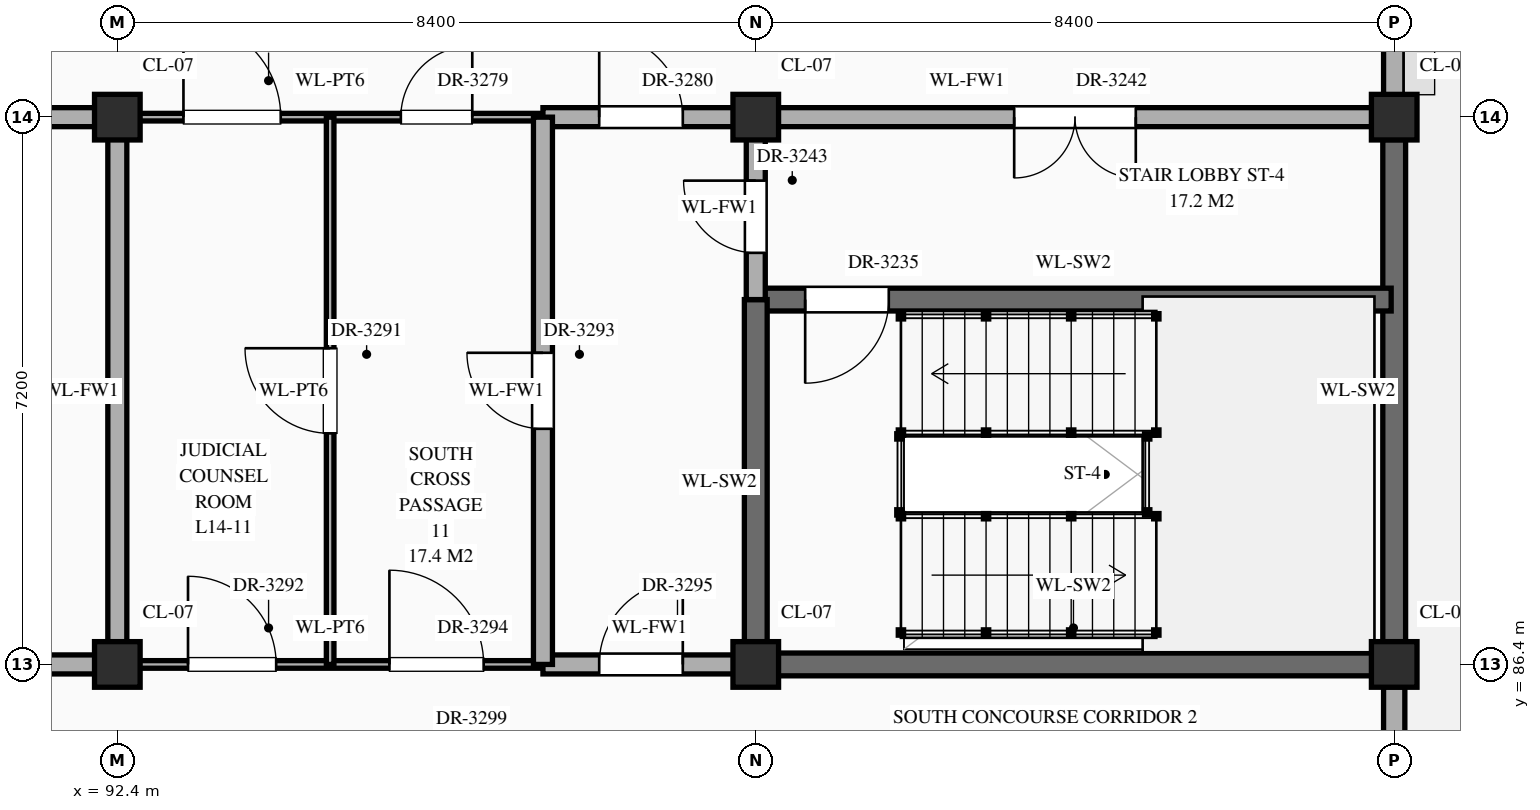
"""IFC4 building model, lengths in metres.
Left out: names, types, materials, properties, quantities, classifications, styles, units other than length and angle.
Written with IfcOpenShell. Run it as: python <this file> out.ifc"""

import sys

from ifc_helpers import new_model, si_unit, direction, frame, frame_2d, origin, origin_2d, place, context, subcontext, project, spatial, rectangle, extrude, element, fill, save


model = new_model("IFC4")
c1 = context("Model", 3, precision=1e-05, world=origin(), true_north=direction((0.0, 1.0)))
c2 = subcontext(c1, "Body", "Model", "MODEL_VIEW")
j1 = project(units=[si_unit("LENGTHUNIT", "METRE"), si_unit("PLANEANGLEUNIT", "RADIAN")], contexts=[c1])
p1 = place(None, origin())
s1 = spatial("IfcSite", under=j1, at=p1, CompositionType="ELEMENT")
p2 = place(p1, origin())
s2 = spatial("IfcBuilding", under=s1, at=p2, CompositionType="ELEMENT")
p3 = place(p2, frame((0.0, 0.0, 60.3)))
s3 = spatial("IfcBuildingStorey", under=s2, at=p3, CompositionType="ELEMENT", Elevation=60.3)
for number, where, z_axis, x_axis in (
    (1, (92.4, 86.4, 0.0), (0.0, 0.0, 1.0), (1.0, 0.0, 0.0)),
    (2, (92.4, 93.6, 0.0), (0.0, 0.0, 1.0), (1.0, 0.0, 0.0)),
    (3, (100.8, 86.4, 0.0), (0.0, 0.0, 1.0), (1.0, 0.0, 0.0)),
    (4, (100.8, 93.6, 0.0), (0.0, 0.0, 1.0), (1.0, 0.0, 0.0)),
    (5, (109.2, 86.4, 0.0), (0.0, 0.0, 1.0), (1.0, 0.0, 0.0)),
    (6, (109.2, 93.6, 0.0), (0.0, 0.0, 1.0), (1.0, 0.0, 0.0)),
):
    element("IfcColumn", number, at=place(p3, frame(where, z_axis=z_axis, x_axis=x_axis)), inside=s3, PredefinedType="COLUMN", context=c2, shape_type="SweptSolid", body=[
        extrude(rectangle(XDim=0.6, YDim=0.6, at=origin_2d()), origin(), (0.0, 0.0, 1.0), 4.2),
    ])
p4 = place(p3, frame((109.2, 79.495, 0.0), z_axis=(0.0, 0.0, 1.0), x_axis=(0.0, 1.0, 0.0)))
e7 = element("IfcWall", 7, at=p4, inside=s3, PredefinedType="STANDARD", context=c2, shape_type="SweptSolid", body=[
    extrude(rectangle(XDim=6.61, YDim=0.28, at=frame_2d((3.305, 0.0))), origin(), (0.0, 0.0, 1.0), 3.31),
])
p5 = place(p4, frame((1.205, 0.0, 0.0)))
e8 = element("IfcOpeningElement", 8, at=p5, cuts=e7, PredefinedType="OPENING", context=c2, shape_type="SweptSolid", body=[
    extrude(rectangle(XDim=1.8, YDim=2.25, at=frame_2d((0.9, 1.125))), frame((0.0, 0.152, 0.0), z_axis=(0.0, -1.0, 0.0), x_axis=(1.0, 0.0, 0.0)), (0.0, 0.0, 1.0), 0.304),
])
p6 = place(p3, frame((109.2, 86.695, 0.0), z_axis=(0.0, 0.0, 1.0), x_axis=(0.0, 1.0, 0.0)))
e9 = element("IfcWall", 9, at=p6, inside=s3, PredefinedType="SHEAR", context=c2, shape_type="SweptSolid", body=[
    extrude(rectangle(XDim=6.61, YDim=0.3, at=frame_2d((3.305, 0.0))), origin(), (0.0, 0.0, 1.0), 3.96),
])
p7 = place(p3, frame((109.2, 93.895, 0.0), z_axis=(0.0, 0.0, 1.0), x_axis=(0.0, 1.0, 0.0)))
e10 = element("IfcWall", 10, at=p7, inside=s3, PredefinedType="STANDARD", context=c2, shape_type="SweptSolid", body=[
    extrude(rectangle(XDim=6.61, YDim=0.28, at=frame_2d((3.305, 0.0))), origin(), (0.0, 0.0, 1.0), 3.31),
])
p8 = place(p7, frame((4.08, 0.0, 0.85)))
e11 = element("IfcOpeningElement", 11, at=p8, cuts=e10, PredefinedType="OPENING", context=c2, shape_type="SweptSolid", body=[
    extrude(rectangle(XDim=1.05, YDim=1.2, at=frame_2d((0.525, 0.6))), frame((0.0, 0.152, 0.0), z_axis=(0.0, -1.0, 0.0), x_axis=(1.0, 0.0, 0.0)), (0.0, 0.0, 1.0), 0.304),
])
p9 = place(p3, frame((84.0, 86.4, 0.0), z_axis=(0.0, 0.0, 1.0), x_axis=(1.0, 0.0, 0.0)))
e12 = element("IfcWall", 12, at=p9, inside=s3, PredefinedType="STANDARD", context=c2, shape_type="SweptSolid", body=[
    extrude(rectangle(XDim=8.4, YDim=0.25, at=frame_2d((4.2, 0.0))), origin(), (0.0, 0.0, 1.0), 3.11),
])
p10 = place(p9, frame((3.7, 0.0, 0.0)))
e13 = element("IfcOpeningElement", 13, at=p10, cuts=e12, PredefinedType="OPENING", context=c2, shape_type="SweptSolid", body=[
    extrude(rectangle(XDim=1.0, YDim=2.2, at=frame_2d((0.5, 1.1))), frame((0.0, 0.137, 0.0), z_axis=(0.0, -1.0, 0.0), x_axis=(1.0, 0.0, 0.0)), (0.0, 0.0, 1.0), 0.274),
])
p11 = place(p3, frame((92.4, 86.4, 0.0), z_axis=(0.0, 0.0, 1.0), x_axis=(1.0, 0.0, 0.0)))
e14 = element("IfcWall", 14, at=p11, inside=s3, PredefinedType="STANDARD", context=c2, shape_type="SweptSolid", body=[
    extrude(rectangle(XDim=5.6, YDim=0.1, at=frame_2d((2.8, 0.0))), origin(), (0.0, 0.0, 1.0), 3.11),
])
p12 = place(p11, frame((0.93, 0.0, 0.0)))
e15 = element("IfcOpeningElement", 15, at=p12, cuts=e14, PredefinedType="OPENING", context=c2, shape_type="SweptSolid", body=[
    extrude(rectangle(XDim=1.16, YDim=2.3, at=frame_2d((0.58, 1.15))), frame((0.0, 0.062, 0.0), z_axis=(0.0, -1.0, 0.0), x_axis=(1.0, 0.0, 0.0)), (0.0, 0.0, 1.0), 0.124),
])
p13 = place(p11, frame((3.58, 0.0, 0.0)))
e16 = element("IfcOpeningElement", 16, at=p13, cuts=e14, PredefinedType="OPENING", context=c2, shape_type="SweptSolid", body=[
    extrude(rectangle(XDim=1.24, YDim=2.3, at=frame_2d((0.62, 1.15))), frame((0.0, 0.062, 0.0), z_axis=(0.0, -1.0, 0.0), x_axis=(1.0, 0.0, 0.0)), (0.0, 0.0, 1.0), 0.124),
])
p14 = place(p3, frame((98.0, 86.4, 0.0), z_axis=(0.0, 0.0, 1.0), x_axis=(1.0, 0.0, 0.0)))
e17 = element("IfcWall", 17, at=p14, inside=s3, PredefinedType="STANDARD", context=c2, shape_type="SweptSolid", body=[
    extrude(rectangle(XDim=2.8, YDim=0.25, at=frame_2d((1.4, 0.0))), origin(), (0.0, 0.0, 1.0), 3.11),
])
p15 = place(p14, frame((0.74, 0.0, 0.0)))
e18 = element("IfcOpeningElement", 18, at=p15, cuts=e17, PredefinedType="OPENING", context=c2, shape_type="SweptSolid", body=[
    extrude(rectangle(XDim=1.1, YDim=2.2, at=frame_2d((0.55, 1.1))), frame((0.0, 0.137, 0.0), z_axis=(0.0, -1.0, 0.0), x_axis=(1.0, 0.0, 0.0)), (0.0, 0.0, 1.0), 0.274),
])
p16 = place(p3, frame((100.8, 86.4, 0.0), z_axis=(0.0, 0.0, 1.0), x_axis=(1.0, 0.0, 0.0)))
e19 = element("IfcWall", 19, at=p16, inside=s3, PredefinedType="SHEAR", context=c2, shape_type="SweptSolid", body=[
    extrude(rectangle(XDim=8.36, YDim=0.3, at=frame_2d((4.18, 0.0))), origin(), (0.0, 0.0, 1.0), 3.96),
])
p17 = place(p3, frame((100.8, 91.2, 0.0), z_axis=(0.0, 0.0, 1.0), x_axis=(1.0, 0.0, 0.0)))
e20 = element("IfcWall", 20, at=p17, inside=s3, PredefinedType="SHEAR", context=c2, shape_type="SweptSolid", body=[
    extrude(rectangle(XDim=8.36, YDim=0.3, at=frame_2d((4.18, 0.0))), origin(), (0.0, 0.0, 1.0), 3.96),
])
p18 = place(p17, frame((0.65, 0.0, 0.0)))
e21 = element("IfcOpeningElement", 21, at=p18, cuts=e20, PredefinedType="OPENING", context=c2, shape_type="SweptSolid", body=[
    extrude(rectangle(XDim=1.1, YDim=2.2, at=frame_2d((0.55, 1.1))), frame((0.0, 0.162, 0.0), z_axis=(0.0, -1.0, 0.0), x_axis=(1.0, 0.0, 0.0)), (0.0, 0.0, 1.0), 0.324),
])
p19 = place(p3, frame((84.0, 93.6, 0.0), z_axis=(0.0, 0.0, 1.0), x_axis=(1.0, 0.0, 0.0)))
e22 = element("IfcWall", 22, at=p19, inside=s3, PredefinedType="STANDARD", context=c2, shape_type="SweptSolid", body=[
    extrude(rectangle(XDim=8.4, YDim=0.25, at=frame_2d((4.2, 0.0))), origin(), (0.0, 0.0, 1.0), 3.11),
])
p20 = place(p19, frame((3.65, 0.0, 0.0)))
e23 = element("IfcOpeningElement", 23, at=p20, cuts=e22, PredefinedType="OPENING", context=c2, shape_type="SweptSolid", body=[
    extrude(rectangle(XDim=1.1, YDim=2.2, at=frame_2d((0.55, 1.1))), frame((0.0, 0.137, 0.0), z_axis=(0.0, -1.0, 0.0), x_axis=(1.0, 0.0, 0.0)), (0.0, 0.0, 1.0), 0.274),
])
p21 = place(p3, frame((92.4, 93.6, 0.0), z_axis=(0.0, 0.0, 1.0), x_axis=(1.0, 0.0, 0.0)))
e24 = element("IfcWall", 24, at=p21, inside=s3, PredefinedType="STANDARD", context=c2, shape_type="SweptSolid", body=[
    extrude(rectangle(XDim=5.6, YDim=0.1, at=frame_2d((2.8, 0.0))), origin(), (0.0, 0.0, 1.0), 3.11),
])
p22 = place(p21, frame((0.87, 0.0, 0.0)))
e25 = element("IfcOpeningElement", 25, at=p22, cuts=e24, PredefinedType="OPENING", context=c2, shape_type="SweptSolid", body=[
    extrude(rectangle(XDim=1.28, YDim=2.35, at=frame_2d((0.64, 1.175))), frame((0.0, 0.062, 0.0), z_axis=(0.0, -1.0, 0.0), x_axis=(1.0, 0.0, 0.0)), (0.0, 0.0, 1.0), 0.124),
])
p23 = place(p21, frame((3.73, 0.0, 0.0)))
e26 = element("IfcOpeningElement", 26, at=p23, cuts=e24, PredefinedType="OPENING", context=c2, shape_type="SweptSolid", body=[
    extrude(rectangle(XDim=0.94, YDim=2.3, at=frame_2d((0.47, 1.15))), frame((0.0, 0.062, 0.0), z_axis=(0.0, -1.0, 0.0), x_axis=(1.0, 0.0, 0.0)), (0.0, 0.0, 1.0), 0.124),
])
p24 = place(p3, frame((98.0, 93.6, 0.0), z_axis=(0.0, 0.0, 1.0), x_axis=(1.0, 0.0, 0.0)))
e27 = element("IfcWall", 27, at=p24, inside=s3, PredefinedType="STANDARD", context=c2, shape_type="SweptSolid", body=[
    extrude(rectangle(XDim=11.16, YDim=0.25, at=frame_2d((5.58, 0.0))), origin(), (0.0, 0.0, 1.0), 3.11),
])
p25 = place(p24, frame((6.2, 0.0, 0.0)))
e28 = element("IfcOpeningElement", 28, at=p25, cuts=e27, PredefinedType="OPENING", context=c2, shape_type="SweptSolid", body=[
    extrude(rectangle(XDim=1.6, YDim=2.3, at=frame_2d((0.8, 1.15))), frame((0.0, 0.137, 0.0), z_axis=(0.0, -1.0, 0.0), x_axis=(1.0, 0.0, 0.0)), (0.0, 0.0, 1.0), 0.274),
])
p26 = place(p24, frame((0.74, 0.0, 0.0)))
e29 = element("IfcOpeningElement", 29, at=p26, cuts=e27, PredefinedType="OPENING", context=c2, shape_type="SweptSolid", body=[
    extrude(rectangle(XDim=1.1, YDim=2.2, at=frame_2d((0.55, 1.1))), frame((0.0, 0.137, 0.0), z_axis=(0.0, -1.0, 0.0), x_axis=(1.0, 0.0, 0.0)), (0.0, 0.0, 1.0), 0.274),
])
p27 = place(p3, frame((92.4, 86.4, 0.0), z_axis=(0.0, 0.0, 1.0), x_axis=(0.0, 1.0, 0.0)))
e30 = element("IfcWall", 30, at=p27, inside=s3, PredefinedType="STANDARD", context=c2, shape_type="SweptSolid", body=[
    extrude(rectangle(XDim=7.2, YDim=0.25, at=frame_2d((3.6, 0.0))), origin(), (0.0, 0.0, 1.0), 3.21),
])
p28 = place(p3, frame((95.2, 86.4, 0.0), z_axis=(0.0, 0.0, 1.0), x_axis=(0.0, 1.0, 0.0)))
e31 = element("IfcWall", 31, at=p28, inside=s3, PredefinedType="STANDARD", context=c2, shape_type="SweptSolid", body=[
    extrude(rectangle(XDim=7.2, YDim=0.1, at=frame_2d((3.6, 0.0))), origin(), (0.0, 0.0, 1.0), 3.96),
])
p29 = place(p28, frame((3.04, 0.0, 0.0)))
e32 = element("IfcOpeningElement", 32, at=p29, cuts=e31, PredefinedType="OPENING", context=c2, shape_type="SweptSolid", body=[
    extrude(rectangle(XDim=1.12, YDim=2.25, at=frame_2d((0.56, 1.125))), frame((0.0, 0.062, 0.0), z_axis=(0.0, -1.0, 0.0), x_axis=(1.0, 0.0, 0.0)), (0.0, 0.0, 1.0), 0.124),
])
p30 = place(p3, frame((98.0, 86.4, 0.0), z_axis=(0.0, 0.0, 1.0), x_axis=(0.0, 1.0, 0.0)))
e33 = element("IfcWall", 33, at=p30, inside=s3, PredefinedType="STANDARD", context=c2, shape_type="SweptSolid", body=[
    extrude(rectangle(XDim=7.2, YDim=0.25, at=frame_2d((3.6, 0.0))), origin(), (0.0, 0.0, 1.0), 3.96),
])
p31 = place(p30, frame((3.1, 0.0, 0.0)))
e34 = element("IfcOpeningElement", 34, at=p31, cuts=e33, PredefinedType="OPENING", context=c2, shape_type="SweptSolid", body=[
    extrude(rectangle(XDim=1.0, YDim=2.2, at=frame_2d((0.5, 1.1))), frame((0.0, 0.137, 0.0), z_axis=(0.0, -1.0, 0.0), x_axis=(1.0, 0.0, 0.0)), (0.0, 0.0, 1.0), 0.274),
])
p32 = place(p3, frame((100.8, 86.4, 0.0), z_axis=(0.0, 0.0, 1.0), x_axis=(0.0, 1.0, 0.0)))
e35 = element("IfcWall", 35, at=p32, inside=s3, PredefinedType="SHEAR", context=c2, shape_type="SweptSolid", body=[
    extrude(rectangle(XDim=4.8, YDim=0.3, at=frame_2d((2.4, 0.0))), origin(), (0.0, 0.0, 1.0), 3.96),
])
p33 = place(p3, frame((100.8, 91.2, 0.0), z_axis=(0.0, 0.0, 1.0), x_axis=(0.0, 1.0, 0.0)))
e36 = element("IfcWall", 36, at=p33, inside=s3, PredefinedType="STANDARD", context=c2, shape_type="SweptSolid", body=[
    extrude(rectangle(XDim=2.4, YDim=0.25, at=frame_2d((1.2, 0.0))), origin(), (0.0, 0.0, 1.0), 3.21),
])
p34 = place(p33, frame((0.615, 0.0, 0.0)))
e37 = element("IfcOpeningElement", 37, at=p34, cuts=e36, PredefinedType="OPENING", context=c2, shape_type="SweptSolid", body=[
    extrude(rectangle(XDim=0.95, YDim=2.15, at=frame_2d((0.475, 1.075))), frame((0.0, 0.137, 0.0), z_axis=(0.0, -1.0, 0.0), x_axis=(1.0, 0.0, 0.0)), (0.0, 0.0, 1.0), 0.274),
])
p35 = place(p18, frame((1.1, 0.0, 0.0), z_axis=(0.0, 0.0, 1.0), x_axis=(-1.0, 0.0, 0.0)))
e38 = element("IfcDoor", 38, at=p35, inside=s3, OperationType="SINGLE_SWING_RIGHT", PredefinedType="DOOR", context=c2, shape_type="SweptSolid", body=[
    extrude(rectangle(XDim=1.1, YDim=2.2, at=frame_2d((0.55, 1.1))), frame((0.0, 0.025, 0.0), z_axis=(0.0, -1.0, 0.0), x_axis=(1.0, 0.0, 0.0)), (0.0, 0.0, 1.0), 0.05),
])
fill(e21, e38)
p36 = place(p25, frame((1.6, 0.0, 0.0), z_axis=(0.0, 0.0, 1.0), x_axis=(-1.0, 0.0, 0.0)))
e39 = element("IfcDoor", 39, at=p36, inside=s3, OperationType="DOUBLE_DOOR_SINGLE_SWING", PredefinedType="DOOR", context=c2, shape_type="SweptSolid", body=[
    extrude(rectangle(XDim=1.6, YDim=2.3, at=frame_2d((0.8, 1.15))), frame((0.0, 0.025, 0.0), z_axis=(0.0, -1.0, 0.0), x_axis=(1.0, 0.0, 0.0)), (0.0, 0.0, 1.0), 0.05),
])
fill(e28, e39)
p37 = place(p34, origin())
e40 = element("IfcDoor", 40, at=p37, inside=s3, OperationType="SINGLE_SWING_RIGHT", PredefinedType="DOOR", context=c2, shape_type="SweptSolid", body=[
    extrude(rectangle(XDim=0.95, YDim=2.15, at=frame_2d((0.475, 1.075))), frame((0.0, 0.025, 0.0), z_axis=(0.0, -1.0, 0.0), x_axis=(1.0, 0.0, 0.0)), (0.0, 0.0, 1.0), 0.05),
])
fill(e37, e40)
p38 = place(p22, origin())
e41 = element("IfcDoor", 41, at=p38, inside=s3, OperationType="SINGLE_SWING_LEFT", PredefinedType="DOOR", context=c2, shape_type="SweptSolid", body=[
    extrude(rectangle(XDim=1.28, YDim=2.35, at=frame_2d((0.64, 1.175))), frame((0.0, 0.025, 0.0), z_axis=(0.0, -1.0, 0.0), x_axis=(1.0, 0.0, 0.0)), (0.0, 0.0, 1.0), 0.05),
])
fill(e25, e41)
p39 = place(p23, origin())
e42 = element("IfcDoor", 42, at=p39, inside=s3, OperationType="SINGLE_SWING_RIGHT", PredefinedType="DOOR", context=c2, shape_type="SweptSolid", body=[
    extrude(rectangle(XDim=0.94, YDim=2.3, at=frame_2d((0.47, 1.15))), frame((0.0, 0.025, 0.0), z_axis=(0.0, -1.0, 0.0), x_axis=(1.0, 0.0, 0.0)), (0.0, 0.0, 1.0), 0.05),
])
fill(e26, e42)
p40 = place(p26, origin())
e43 = element("IfcDoor", 43, at=p40, inside=s3, OperationType="SINGLE_SWING_LEFT", PredefinedType="DOOR", context=c2, shape_type="SweptSolid", body=[
    extrude(rectangle(XDim=1.1, YDim=2.2, at=frame_2d((0.55, 1.1))), frame((0.0, 0.025, 0.0), z_axis=(0.0, -1.0, 0.0), x_axis=(1.0, 0.0, 0.0)), (0.0, 0.0, 1.0), 0.05),
])
fill(e29, e43)
p41 = place(p29, origin())
e44 = element("IfcDoor", 44, at=p41, inside=s3, OperationType="SINGLE_SWING_RIGHT", PredefinedType="DOOR", context=c2, shape_type="SweptSolid", body=[
    extrude(rectangle(XDim=1.12, YDim=2.25, at=frame_2d((0.56, 1.125))), frame((0.0, 0.025, 0.0), z_axis=(0.0, -1.0, 0.0), x_axis=(1.0, 0.0, 0.0)), (0.0, 0.0, 1.0), 0.05),
])
fill(e32, e44)
p42 = place(p12, origin())
e45 = element("IfcDoor", 45, at=p42, inside=s3, OperationType="SINGLE_SWING_LEFT", PredefinedType="DOOR", context=c2, shape_type="SweptSolid", body=[
    extrude(rectangle(XDim=1.16, YDim=2.3, at=frame_2d((0.58, 1.15))), frame((0.0, 0.025, 0.0), z_axis=(0.0, -1.0, 0.0), x_axis=(1.0, 0.0, 0.0)), (0.0, 0.0, 1.0), 0.05),
])
fill(e15, e45)
p43 = place(p31, origin())
e46 = element("IfcDoor", 46, at=p43, inside=s3, OperationType="SINGLE_SWING_RIGHT", PredefinedType="DOOR", context=c2, shape_type="SweptSolid", body=[
    extrude(rectangle(XDim=1.0, YDim=2.2, at=frame_2d((0.5, 1.1))), frame((0.0, 0.025, 0.0), z_axis=(0.0, -1.0, 0.0), x_axis=(1.0, 0.0, 0.0)), (0.0, 0.0, 1.0), 0.05),
])
fill(e34, e46)
p44 = place(p13, origin())
e47 = element("IfcDoor", 47, at=p44, inside=s3, OperationType="SINGLE_SWING_LEFT", PredefinedType="DOOR", context=c2, shape_type="SweptSolid", body=[
    extrude(rectangle(XDim=1.24, YDim=2.3, at=frame_2d((0.62, 1.15))), frame((0.0, 0.025, 0.0), z_axis=(0.0, -1.0, 0.0), x_axis=(1.0, 0.0, 0.0)), (0.0, 0.0, 1.0), 0.05),
])
fill(e16, e47)
p45 = place(p15, origin())
e48 = element("IfcDoor", 48, at=p45, inside=s3, OperationType="SINGLE_SWING_RIGHT", PredefinedType="DOOR", context=c2, shape_type="SweptSolid", body=[
    extrude(rectangle(XDim=1.1, YDim=2.2, at=frame_2d((0.55, 1.1))), frame((0.0, 0.025, 0.0), z_axis=(0.0, -1.0, 0.0), x_axis=(1.0, 0.0, 0.0)), (0.0, 0.0, 1.0), 0.05),
])
fill(e18, e48)
save(model, sys.argv[1])
